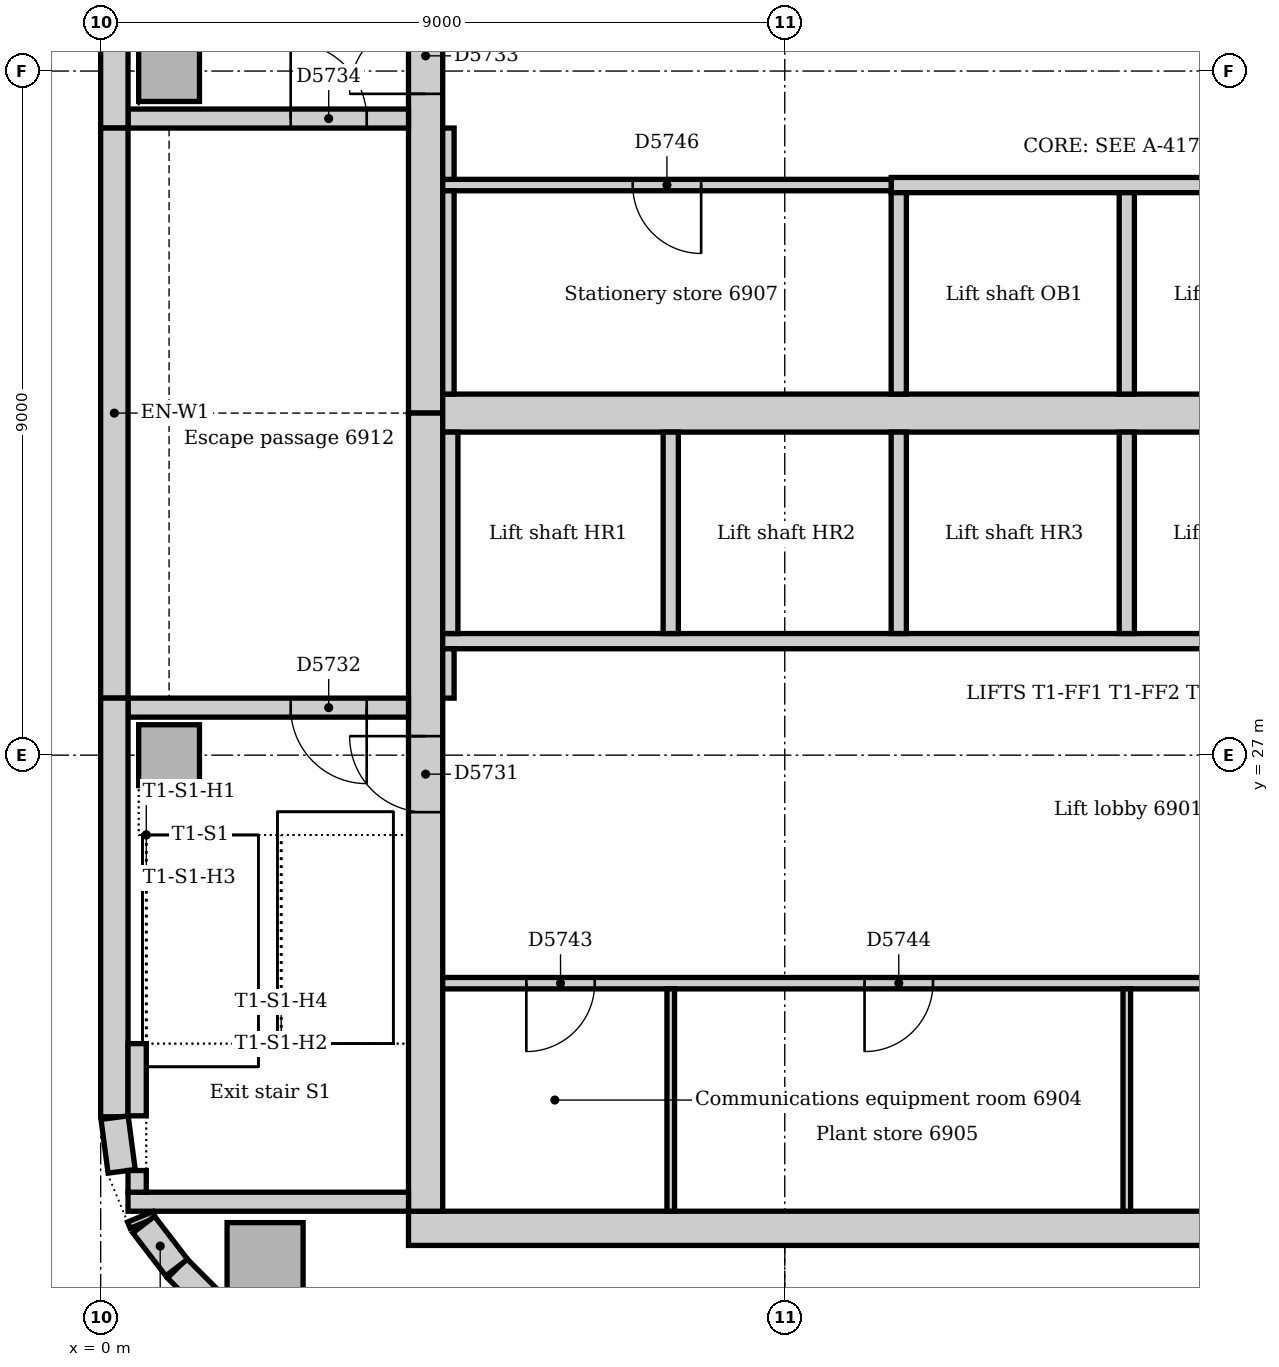
"""IFC4 building model, lengths in metres.
Left out: names, types, materials, properties, quantities, classifications, styles, units other than length and angle.
Written with IfcOpenShell. Run it as: python <this file> out.ifc"""

import sys

from ifc_helpers import new_model, si_unit, direction, frame, frame_2d, origin, origin_2d, place, context, subcontext, project, spatial, rectangle, extrude, element, fill, save


model = new_model("IFC4")
c1 = context("Model", 3, precision=1e-05, world=origin(), true_north=direction((0.0, 1.0)))
c2 = subcontext(c1, "Body", "Model", "MODEL_VIEW")
j1 = project(units=[si_unit("LENGTHUNIT", "METRE"), si_unit("PLANEANGLEUNIT", "RADIAN")], contexts=[c1])
p1 = place(None, origin())
s1 = spatial("IfcSite", under=j1, at=p1, CompositionType="ELEMENT")
p2 = place(p1, origin())
s2 = spatial("IfcBuilding", under=s1, at=p2, CompositionType="ELEMENT")
p3 = place(p2, frame((0.0, 0.0, 291.0)))
s3 = spatial("IfcBuildingStorey", under=s2, at=p3, CompositionType="ELEMENT", Elevation=291.0)
p4 = place(p3, frame((4.05, 20.775, 0.0), z_axis=(0.0, 0.0, 1.0), x_axis=(1.0, 0.0, 0.0)))
e1 = element("IfcWall", 1, at=p4, inside=s3, PredefinedType="SOLIDWALL", context=c2, shape_type="SweptSolid", body=[
    extrude(rectangle(XDim=18.9, YDim=0.45, at=frame_2d((9.45, 0.0))), origin(), (0.0, 0.0, 1.0), 6.55),
])
p5 = place(p3, frame((4.275, 42.0, 0.0), z_axis=(0.0, 0.0, 1.0), x_axis=(0.0, -1.0, 0.0)))
e2 = element("IfcWall", 2, at=p5, inside=s3, PredefinedType="SOLIDWALL", context=c2, shape_type="SweptSolid", body=[
    extrude(rectangle(XDim=10.5, YDim=0.45, at=frame_2d((5.25, 0.0))), origin(), (0.0, 0.0, 1.0), 6.55),
])
p6 = place(p5, frame((5.3, 0.0, 0.0)))
e3 = element("IfcOpeningElement", 3, at=p6, cuts=e2, PredefinedType="OPENING", context=c2, shape_type="SweptSolid", body=[
    extrude(rectangle(XDim=1.0, YDim=2.1, at=frame_2d((0.5, 1.05))), frame((0.0, 0.235, 0.0), z_axis=(0.0, -1.0, 0.0), x_axis=(1.0, 0.0, 0.0)), (0.0, 0.0, 1.0), 0.47),
])
p7 = place(p3, frame((4.275, 31.5, 0.0), z_axis=(0.0, 0.0, 1.0), x_axis=(0.0, -1.0, 0.0)))
e4 = element("IfcWall", 4, at=p7, inside=s3, PredefinedType="SOLIDWALL", context=c2, shape_type="SweptSolid", body=[
    extrude(rectangle(XDim=10.5, YDim=0.45, at=frame_2d((5.25, 0.0))), origin(), (0.0, 0.0, 1.0), 6.55),
])
p8 = place(p7, frame((4.25, 0.0, 0.0)))
e5 = element("IfcOpeningElement", 5, at=p8, cuts=e4, PredefinedType="OPENING", context=c2, shape_type="SweptSolid", body=[
    extrude(rectangle(XDim=1.0, YDim=2.1, at=frame_2d((0.5, 1.05))), frame((0.0, 0.235, 0.0), z_axis=(0.0, -1.0, 0.0), x_axis=(1.0, 0.0, 0.0)), (0.0, 0.0, 1.0), 0.47),
])
p9 = place(p3, frame((4.5, 31.5, 0.0), z_axis=(0.0, 0.0, 1.0), x_axis=(1.0, 0.0, 0.0)))
e6 = element("IfcWall", 6, at=p9, inside=s3, PredefinedType="SOLIDWALL", context=c2, shape_type="SweptSolid", body=[
    extrude(rectangle(XDim=18.0, YDim=0.5, at=frame_2d((9.0, 0.0))), origin(), (0.0, 0.0, 1.0), 6.55),
])
p10 = place(p3, frame((0.36, 21.125, 0.0), z_axis=(0.0, 0.0, 1.0), x_axis=(1.0, 0.0, 0.0)))
e7 = element("IfcWall", 7, at=p10, inside=s3, PredefinedType="SOLIDWALL", context=c2, shape_type="SweptSolid", body=[
    extrude(rectangle(XDim=3.69, YDim=0.25, at=frame_2d((1.845, 0.0))), origin(), (0.0, 0.0, 1.0), 6.55),
])
p11 = place(p3, frame((4.05, 27.625, 0.0), z_axis=(0.0, 0.0, 1.0), x_axis=(-1.0, 0.0, 0.0)))
e8 = element("IfcWall", 8, at=p11, inside=s3, PredefinedType="SOLIDWALL", context=c2, shape_type="SweptSolid", body=[
    extrude(rectangle(XDim=3.69, YDim=0.25, at=frame_2d((1.845, 0.0))), origin(), (0.0, 0.0, 1.0), 6.55),
])
p12 = place(p11, frame((0.55, 0.0, 0.0)))
e9 = element("IfcOpeningElement", 9, at=p12, cuts=e8, PredefinedType="OPENING", context=c2, shape_type="SweptSolid", body=[
    extrude(rectangle(XDim=1.0, YDim=2.1, at=frame_2d((0.5, 1.05))), frame((0.0, 0.135, 0.0), z_axis=(0.0, -1.0, 0.0), x_axis=(1.0, 0.0, 0.0)), (0.0, 0.0, 1.0), 0.27),
])
p13 = place(p3, frame((0.36, 35.375, 0.0), z_axis=(0.0, 0.0, 1.0), x_axis=(1.0, 0.0, 0.0)))
e10 = element("IfcWall", 10, at=p13, inside=s3, PredefinedType="SOLIDWALL", context=c2, shape_type="SweptSolid", body=[
    extrude(rectangle(XDim=3.69, YDim=0.25, at=frame_2d((1.845, 0.0))), origin(), (0.0, 0.0, 1.0), 6.55),
])
p14 = place(p13, frame((2.14, 0.0, 0.0)))
e11 = element("IfcOpeningElement", 11, at=p14, cuts=e10, PredefinedType="OPENING", context=c2, shape_type="SweptSolid", body=[
    extrude(rectangle(XDim=1.0, YDim=2.1, at=frame_2d((0.5, 1.05))), frame((0.0, 0.135, 0.0), z_axis=(0.0, -1.0, 0.0), x_axis=(1.0, 0.0, 0.0)), (0.0, 0.0, 1.0), 0.27),
])
p15 = place(p3, frame((2.163, 20.35, 0.0), z_axis=(0.0, 0.0, 1.0), x_axis=(1.0, 0.0, 0.0)))
e12 = element("IfcColumn", 12, at=p15, inside=s3, PredefinedType="COLUMN", context=c2, shape_type="SweptSolid", body=[
    extrude(rectangle(XDim=1.0, YDim=1.0, at=origin_2d()), origin(), (0.0, 0.0, 1.0), 6.55),
])
for number, where, z_axis, x_axis in (
    (13, (0.9, 27.0, 0.0), (0.0, 0.0, 1.0), (1.0, 0.0, 0.0)),
    (14, (0.9, 36.0, 0.0), (0.0, 0.0, 1.0), (1.0, 0.0, 0.0)),
):
    element("IfcColumn", number, at=place(p3, frame(where, z_axis=z_axis, x_axis=x_axis)), inside=s3, PredefinedType="COLUMN", context=c2, shape_type="SweptSolid", body=[
        extrude(rectangle(XDim=0.8, YDim=0.8, at=origin_2d()), origin(), (0.0, 0.0, 1.0), 7.0),
    ])
p16 = place(p3, frame((0.18, 42.0, 0.0), z_axis=(0.0, 0.0, 1.0), x_axis=(0.0, -1.0, 0.0)))
e15 = element("IfcWall", 15, at=p16, inside=s3, PredefinedType="STANDARD", context=c2, shape_type="SweptSolid", body=[
    extrude(rectangle(XDim=6.75, YDim=0.36, at=frame_2d((3.375, 0.0))), origin(), (0.0, 0.0, 1.0), 6.55),
])
p17 = place(p3, frame((0.18, 35.25, 0.0), z_axis=(0.0, 0.0, 1.0), x_axis=(0.0, -1.0, 0.0)))
e16 = element("IfcWall", 16, at=p17, inside=s3, PredefinedType="STANDARD", context=c2, shape_type="SweptSolid", body=[
    extrude(rectangle(XDim=7.5, YDim=0.36, at=frame_2d((3.75, 0.0))), origin(), (0.0, 0.0, 1.0), 6.55),
])
p18 = place(p3, frame((0.18, 27.75, 0.0), z_axis=(0.0, 0.0, 1.0), x_axis=(0.0, -1.0, 0.0)))
e17 = element("IfcWall", 17, at=p18, inside=s3, PredefinedType="STANDARD", context=c2, shape_type="SweptSolid", body=[
    extrude(rectangle(XDim=5.507, YDim=0.36, at=frame_2d((2.754, 0.0))), origin(), (0.0, 0.0, 1.0), 6.55),
])
p19 = place(p3, frame((1.006, 20.249, 0.0), z_axis=(0.0, 0.0, 1.0), x_axis=(0.707106781187, -0.707106781187, 0.0)))
e18 = element("IfcWall", 18, at=p19, inside=s3, PredefinedType="STANDARD", context=c2, shape_type="SweptSolid", body=[
    extrude(rectangle(XDim=1.757, YDim=0.36, at=frame_2d((0.879, 0.0))), origin(), (0.0, 0.0, 1.0), 6.55),
])
p20 = place(p3, frame((0.183, 22.231, 0.0), z_axis=(0.0, 0.0, 1.0), x_axis=(0.13055608231, -0.99144092581, 0.0)))
e19 = element("IfcWall", 19, at=p20, inside=s3, PredefinedType="STANDARD", context=c2, shape_type="SweptSolid", body=[
    extrude(rectangle(XDim=0.713, YDim=0.36, at=frame_2d((0.356, 0.0))), origin(), (0.0, 0.0, 1.0), 6.55),
])
p21 = place(p3, frame((0.521, 20.927, 0.0), z_axis=(0.0, 0.0, 1.0), x_axis=(0.382549378284, -0.923935048136, 0.0)))
e20 = element("IfcWall", 20, at=p21, inside=s3, PredefinedType="STANDARD", context=c2, shape_type="SweptSolid", body=[
    extrude(rectangle(XDim=0.089, YDim=0.36, at=frame_2d((0.045, 0.0))), origin(), (0.0, 0.0, 1.0), 6.55),
])
p22 = place(p3, frame((0.566, 20.825, 0.0), z_axis=(0.0, 0.0, 1.0), x_axis=(0.608802368033, -0.793321924995, 0.0)))
e21 = element("IfcWall", 21, at=p22, inside=s3, PredefinedType="STANDARD", context=c2, shape_type="SweptSolid", body=[
    extrude(rectangle(XDim=0.713, YDim=0.36, at=frame_2d((0.357, 0.0))), origin(), (0.0, 0.0, 1.0), 6.55),
])
p23 = place(p3, frame((0.48, 21.25, 0.0), z_axis=(0.0, 0.0, 1.0), x_axis=(0.0, 1.0, 0.0)))
e22 = element("IfcWall", 22, at=p23, inside=s3, PredefinedType="STANDARD", context=c2, shape_type="SweptSolid", body=[
    extrude(rectangle(XDim=0.285, YDim=0.24, at=frame_2d((0.143, 0.0))), origin(), (0.0, 0.0, 1.0), 7.0),
])
p24 = place(p3, frame((0.48, 22.255, 0.0), z_axis=(0.0, 0.0, 1.0), x_axis=(0.0, 1.0, 0.0)))
e23 = element("IfcWall", 23, at=p24, inside=s3, PredefinedType="STANDARD", context=c2, shape_type="SweptSolid", body=[
    extrude(rectangle(XDim=0.95, YDim=0.24, at=frame_2d((0.475, 0.0))), origin(), (0.0, 0.0, 1.0), 7.0),
])
p25 = place(p3, frame((4.5, 28.5, 0.0), z_axis=(0.0, 0.0, 1.0), x_axis=(1.0, 0.0, 0.0)))
e24 = element("IfcWall", 24, at=p25, inside=s3, PredefinedType="PARTITIONING", context=c2, shape_type="SweptSolid", body=[
    extrude(rectangle(XDim=18.0, YDim=0.2, at=frame_2d((9.0, 0.0))), origin(), (0.0, 0.0, 1.0), 6.55),
])
p26 = place(p3, frame((10.4, 34.5, 0.0), z_axis=(0.0, 0.0, 1.0), x_axis=(1.0, 0.0, 0.0)))
e25 = element("IfcWall", 25, at=p26, inside=s3, PredefinedType="PARTITIONING", context=c2, shape_type="SweptSolid", body=[
    extrude(rectangle(XDim=12.1, YDim=0.2, at=frame_2d((6.05, 0.0))), origin(), (0.0, 0.0, 1.0), 6.55),
])
p27 = place(p26, frame((7.05, 0.0, 0.0)))
e26 = element("IfcOpeningElement", 26, at=p27, cuts=e25, PredefinedType="OPENING", context=c2, shape_type="SweptSolid", body=[
    extrude(rectangle(XDim=1.1, YDim=2.1, at=frame_2d((0.55, 1.05))), frame((0.0, 0.11, 0.0), z_axis=(0.0, -1.0, 0.0), x_axis=(1.0, 0.0, 0.0)), (0.0, 0.0, 1.0), 0.22),
])
p28 = place(p26, frame((10.05, 0.0, 0.0)))
e27 = element("IfcOpeningElement", 27, at=p28, cuts=e25, PredefinedType="OPENING", context=c2, shape_type="SweptSolid", body=[
    extrude(rectangle(XDim=1.1, YDim=2.1, at=frame_2d((0.55, 1.05))), frame((0.0, 0.11, 0.0), z_axis=(0.0, -1.0, 0.0), x_axis=(1.0, 0.0, 0.0)), (0.0, 0.0, 1.0), 0.22),
])
for number, where, z_axis, x_axis in (
    (28, (10.5, 28.6, 0.0), (0.0, 0.0, 1.0), (0.0, 1.0, 0.0)),
    (29, (10.5, 31.75, 0.0), (0.0, 0.0, 1.0), (0.0, 1.0, 0.0)),
    (30, (13.5, 28.6, 0.0), (0.0, 0.0, 1.0), (0.0, 1.0, 0.0)),
    (31, (13.5, 31.75, 0.0), (0.0, 0.0, 1.0), (0.0, 1.0, 0.0)),
    (32, (4.6, 28.6, 0.0), (0.0, 0.0, 1.0), (0.0, 1.0, 0.0)),
    (33, (7.5, 28.6, 0.0), (0.0, 0.0, 1.0), (0.0, 1.0, 0.0)),
):
    element("IfcWall", number, at=place(p3, frame(where, z_axis=z_axis, x_axis=x_axis)), inside=s3, PredefinedType="PARTITIONING", context=c2, shape_type="SweptSolid", body=[
        extrude(rectangle(XDim=2.65, YDim=0.2, at=frame_2d((1.325, 0.0))), origin(), (0.0, 0.0, 1.0), 6.55),
    ])
p29 = place(p3, frame((4.5, 24.0, 0.0), z_axis=(0.0, 0.0, 1.0), x_axis=(1.0, 0.0, 0.0)))
e34 = element("IfcWall", 34, at=p29, inside=s3, PredefinedType="PARTITIONING", context=c2, shape_type="SweptSolid", body=[
    extrude(rectangle(XDim=18.0, YDim=0.15, at=frame_2d((9.0, 0.0))), origin(), (0.0, 0.0, 1.0), 6.55),
])
p30 = place(p29, frame((1.1, 0.0, 0.0)))
e35 = element("IfcOpeningElement", 35, at=p30, cuts=e34, PredefinedType="OPENING", context=c2, shape_type="SweptSolid", body=[
    extrude(rectangle(XDim=0.9, YDim=2.1, at=frame_2d((0.45, 1.05))), frame((0.0, 0.085, 0.0), z_axis=(0.0, -1.0, 0.0), x_axis=(1.0, 0.0, 0.0)), (0.0, 0.0, 1.0), 0.17),
])
p31 = place(p29, frame((5.55, 0.0, 0.0)))
e36 = element("IfcOpeningElement", 36, at=p31, cuts=e34, PredefinedType="OPENING", context=c2, shape_type="SweptSolid", body=[
    extrude(rectangle(XDim=0.9, YDim=2.1, at=frame_2d((0.45, 1.05))), frame((0.0, 0.085, 0.0), z_axis=(0.0, -1.0, 0.0), x_axis=(1.0, 0.0, 0.0)), (0.0, 0.0, 1.0), 0.17),
])
p32 = place(p29, frame((12.95, 0.0, 0.0)))
e37 = element("IfcOpeningElement", 37, at=p32, cuts=e34, PredefinedType="OPENING", context=c2, shape_type="SweptSolid", body=[
    extrude(rectangle(XDim=0.9, YDim=2.1, at=frame_2d((0.45, 1.05))), frame((0.0, 0.085, 0.0), z_axis=(0.0, -1.0, 0.0), x_axis=(1.0, 0.0, 0.0)), (0.0, 0.0, 1.0), 0.17),
])
p33 = place(p3, frame((4.5, 34.5, 0.0), z_axis=(0.0, 0.0, 1.0), x_axis=(1.0, 0.0, 0.0)))
e38 = element("IfcWall", 38, at=p33, inside=s3, PredefinedType="PARTITIONING", context=c2, shape_type="SweptSolid", body=[
    extrude(rectangle(XDim=5.9, YDim=0.15, at=frame_2d((2.95, 0.0))), origin(), (0.0, 0.0, 1.0), 6.55),
])
p34 = place(p33, frame((2.5, 0.0, 0.0)))
e39 = element("IfcOpeningElement", 39, at=p34, cuts=e38, PredefinedType="OPENING", context=c2, shape_type="SweptSolid", body=[
    extrude(rectangle(XDim=0.9, YDim=2.1, at=frame_2d((0.45, 1.05))), frame((0.0, 0.085, 0.0), z_axis=(0.0, -1.0, 0.0), x_axis=(1.0, 0.0, 0.0)), (0.0, 0.0, 1.0), 0.17),
])
p35 = place(p3, frame((4.575, 34.575, 0.0), z_axis=(0.0, 0.0, 1.0), x_axis=(0.0, 1.0, 0.0)))
e40 = element("IfcWall", 40, at=p35, inside=s3, PredefinedType="PARTITIONING", context=c2, shape_type="SweptSolid", body=[
    extrude(rectangle(XDim=0.675, YDim=0.15, at=frame_2d((0.338, 0.0))), origin(), (0.0, 0.0, 1.0), 6.55),
])
p36 = place(p3, frame((4.575, 31.75, 0.0), z_axis=(0.0, 0.0, 1.0), x_axis=(0.0, 1.0, 0.0)))
e41 = element("IfcWall", 41, at=p36, inside=s3, PredefinedType="PARTITIONING", context=c2, shape_type="SweptSolid", body=[
    extrude(rectangle(XDim=2.675, YDim=0.15, at=frame_2d((1.337, 0.0))), origin(), (0.0, 0.0, 1.0), 6.55),
])
p37 = place(p3, frame((4.575, 27.75, 0.0), z_axis=(0.0, 0.0, 1.0), x_axis=(0.0, 1.0, 0.0)))
e42 = element("IfcWall", 42, at=p37, inside=s3, PredefinedType="PARTITIONING", context=c2, shape_type="SweptSolid", body=[
    extrude(rectangle(XDim=0.65, YDim=0.15, at=frame_2d((0.325, 0.0))), origin(), (0.0, 0.0, 1.0), 6.55),
])
for number, where, z_axis, x_axis in (
    (43, (7.5, 21.0, 0.0), (0.0, 0.0, 1.0), (0.0, 1.0, 0.0)),
    (44, (13.5, 21.0, 0.0), (0.0, 0.0, 1.0), (0.0, 1.0, 0.0)),
):
    element("IfcWall", number, at=place(p3, frame(where, z_axis=z_axis, x_axis=x_axis)), inside=s3, PredefinedType="PARTITIONING", context=c2, shape_type="SweptSolid", body=[
        extrude(rectangle(XDim=2.925, YDim=0.1, at=frame_2d((1.462, 0.0))), origin(), (0.0, 0.0, 1.0), 6.55),
    ])
p38 = place(p8, frame((1.0, 0.0, 0.0), z_axis=(0.0, 0.0, 1.0), x_axis=(-1.0, 0.0, 0.0)))
e45 = element("IfcDoor", 45, at=p38, inside=s3, OperationType="SINGLE_SWING_RIGHT", PredefinedType="DOOR", context=c2, shape_type="SweptSolid", body=[
    extrude(rectangle(XDim=1.0, YDim=2.1, at=frame_2d((0.5, 1.05))), frame((0.0, 0.025, 0.0), z_axis=(0.0, -1.0, 0.0), x_axis=(1.0, 0.0, 0.0)), (0.0, 0.0, 1.0), 0.05),
])
fill(e5, e45)
p39 = place(p12, origin())
e46 = element("IfcDoor", 46, at=p39, inside=s3, OperationType="SINGLE_SWING_LEFT", PredefinedType="DOOR", context=c2, shape_type="SweptSolid", body=[
    extrude(rectangle(XDim=1.0, YDim=2.1, at=frame_2d((0.5, 1.05))), frame((0.0, 0.025, 0.0), z_axis=(0.0, -1.0, 0.0), x_axis=(1.0, 0.0, 0.0)), (0.0, 0.0, 1.0), 0.05),
])
fill(e9, e46)
p40 = place(p6, frame((1.0, 0.0, 0.0), z_axis=(0.0, 0.0, 1.0), x_axis=(-1.0, 0.0, 0.0)))
e47 = element("IfcDoor", 47, at=p40, inside=s3, OperationType="SINGLE_SWING_LEFT", PredefinedType="DOOR", context=c2, shape_type="SweptSolid", body=[
    extrude(rectangle(XDim=1.0, YDim=2.1, at=frame_2d((0.5, 1.05))), frame((0.0, 0.025, 0.0), z_axis=(0.0, -1.0, 0.0), x_axis=(1.0, 0.0, 0.0)), (0.0, 0.0, 1.0), 0.05),
])
fill(e3, e47)
p41 = place(p14, origin())
e48 = element("IfcDoor", 48, at=p41, inside=s3, OperationType="SINGLE_SWING_LEFT", PredefinedType="DOOR", context=c2, shape_type="SweptSolid", body=[
    extrude(rectangle(XDim=1.0, YDim=2.1, at=frame_2d((0.5, 1.05))), frame((0.0, 0.025, 0.0), z_axis=(0.0, -1.0, 0.0), x_axis=(1.0, 0.0, 0.0)), (0.0, 0.0, 1.0), 0.05),
])
fill(e11, e48)
p42 = place(p30, frame((0.9, 0.0, 0.0), z_axis=(0.0, 0.0, 1.0), x_axis=(-1.0, 0.0, 0.0)))
e49 = element("IfcDoor", 49, at=p42, inside=s3, OperationType="SINGLE_SWING_RIGHT", PredefinedType="DOOR", context=c2, shape_type="SweptSolid", body=[
    extrude(rectangle(XDim=0.9, YDim=2.1, at=frame_2d((0.45, 1.05))), frame((0.0, 0.025, 0.0), z_axis=(0.0, -1.0, 0.0), x_axis=(1.0, 0.0, 0.0)), (0.0, 0.0, 1.0), 0.05),
])
fill(e35, e49)
p43 = place(p31, frame((0.9, 0.0, 0.0), z_axis=(0.0, 0.0, 1.0), x_axis=(-1.0, 0.0, 0.0)))
e50 = element("IfcDoor", 50, at=p43, inside=s3, OperationType="SINGLE_SWING_RIGHT", PredefinedType="DOOR", context=c2, shape_type="SweptSolid", body=[
    extrude(rectangle(XDim=0.9, YDim=2.1, at=frame_2d((0.45, 1.05))), frame((0.0, 0.025, 0.0), z_axis=(0.0, -1.0, 0.0), x_axis=(1.0, 0.0, 0.0)), (0.0, 0.0, 1.0), 0.05),
])
fill(e36, e50)
p44 = place(p34, frame((0.9, 0.0, 0.0), z_axis=(0.0, 0.0, 1.0), x_axis=(-1.0, 0.0, 0.0)))
e51 = element("IfcDoor", 51, at=p44, inside=s3, OperationType="SINGLE_SWING_LEFT", PredefinedType="DOOR", context=c2, shape_type="SweptSolid", body=[
    extrude(rectangle(XDim=0.9, YDim=2.1, at=frame_2d((0.45, 1.05))), frame((0.0, 0.025, 0.0), z_axis=(0.0, -1.0, 0.0), x_axis=(1.0, 0.0, 0.0)), (0.0, 0.0, 1.0), 0.05),
])
fill(e39, e51)
save(model, sys.argv[1])
